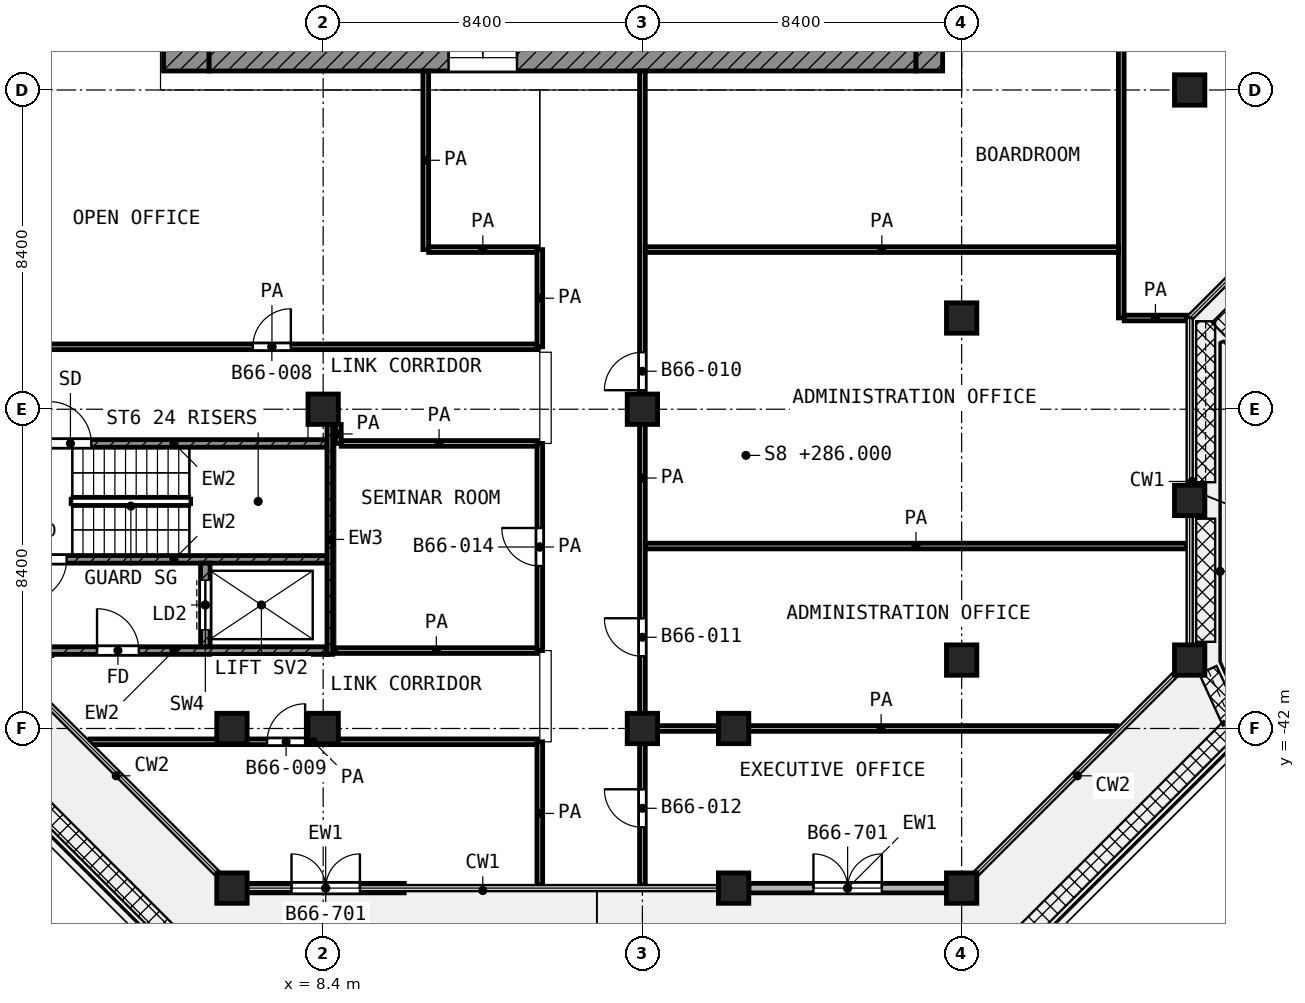
"""IFC4 building model, lengths in metres.
Left out: names, types, materials, properties, quantities, classifications, styles, units other than length and angle.
Written with IfcOpenShell. Run it as: python <this file> out.ifc"""

import sys

from ifc_helpers import new_model, si_unit, direction, frame, frame_2d, origin, origin_2d, place, context, subcontext, project, spatial, rectangle, extrude, element, fill, save


model = new_model("IFC4")
c1 = context("Model", 3, precision=1e-05, world=origin(), true_north=direction((0.0, 1.0)))
c2 = subcontext(c1, "Body", "Model", "MODEL_VIEW")
j1 = project(units=[si_unit("LENGTHUNIT", "METRE"), si_unit("PLANEANGLEUNIT", "RADIAN")], contexts=[c1])
p1 = place(None, origin())
s1 = spatial("IfcSite", under=j1, at=p1, CompositionType="ELEMENT")
p2 = place(p1, origin())
s2 = spatial("IfcBuilding", under=s1, at=p2, CompositionType="ELEMENT")
p3 = place(p2, frame((0.0, 0.0, 286.0)))
s3 = spatial("IfcBuildingStorey", under=s2, at=p3, CompositionType="ELEMENT", Elevation=286.0)
for number, where, z_axis, x_axis in (
    (1, (31.2, -25.2, 0.0), (0.0, 0.0, 1.0), (1.0, 0.0, 0.0)),
    (2, (25.2, -31.2, 0.0), (0.0, 0.0, 1.0), (1.0, 0.0, 0.0)),
    (3, (8.4, -33.6, 0.0), (0.0, 0.0, 1.0), (1.0, 0.0, 0.0)),
    (4, (16.8, -33.6, 0.0), (0.0, 0.0, 1.0), (1.0, 0.0, 0.0)),
    (5, (25.2, -40.2, 0.0), (0.0, 0.0, 1.0), (1.0, 0.0, 0.0)),
    (6, (6.0, -42.0, 0.0), (0.0, 0.0, 1.0), (1.0, 0.0, 0.0)),
    (7, (8.4, -42.0, 0.0), (0.0, 0.0, 1.0), (1.0, 0.0, 0.0)),
    (8, (16.8, -42.0, 0.0), (0.0, 0.0, 1.0), (1.0, 0.0, 0.0)),
    (9, (19.2, -42.0, 0.0), (0.0, 0.0, 1.0), (1.0, 0.0, 0.0)),
    (10, (6.0, -46.2, 0.0), (0.0, 0.0, 1.0), (1.0, 0.0, 0.0)),
    (11, (19.2, -46.2, 0.0), (0.0, 0.0, 1.0), (1.0, 0.0, 0.0)),
    (12, (31.2, -36.0, 0.0), (0.0, 0.0, 1.0), (1.0, 0.0, 0.0)),
    (13, (31.2, -40.2, 0.0), (0.0, 0.0, 1.0), (1.0, 0.0, 0.0)),
    (14, (25.2, -46.2, 0.0), (0.0, 0.0, 1.0), (1.0, 0.0, 0.0)),
):
    element("IfcColumn", number, at=place(p3, frame(where, z_axis=z_axis, x_axis=x_axis)), inside=s3, PredefinedType="COLUMN", context=c2, shape_type="SweptSolid", body=[
        extrude(rectangle(XDim=0.8, YDim=0.8, at=origin_2d()), origin(), (0.0, 0.0, 1.0), 4.2),
    ])
p4 = place(p3, frame((6.4, -46.2, 0.0), z_axis=(0.0, 0.0, 1.0), x_axis=(1.0, 0.0, 0.0)))
e15 = element("IfcWall", 15, at=p4, inside=s3, PredefinedType="SOLIDWALL", context=c2, shape_type="SweptSolid", body=[
    extrude(rectangle(XDim=4.134, YDim=0.25, at=frame_2d((2.067, 0.0))), origin(), (0.0, 0.0, 1.0), 3.48),
])
p5 = place(p4, frame((1.167, 0.0, 0.0)))
e16 = element("IfcOpeningElement", 16, at=p5, cuts=e15, PredefinedType="OPENING", context=c2, shape_type="SweptSolid", body=[
    extrude(rectangle(XDim=1.8, YDim=2.1, at=frame_2d((0.9, 1.05))), frame((0.0, 0.135, 0.0), z_axis=(0.0, -1.0, 0.0), x_axis=(1.0, 0.0, 0.0)), (0.0, 0.0, 1.0), 0.27),
])
p6 = place(p3, frame((19.6, -46.2, 0.0), z_axis=(0.0, 0.0, 1.0), x_axis=(1.0, 0.0, 0.0)))
e17 = element("IfcWall", 17, at=p6, inside=s3, PredefinedType="SOLIDWALL", context=c2, shape_type="SweptSolid", body=[
    extrude(rectangle(XDim=5.2, YDim=0.25, at=frame_2d((2.6, 0.0))), origin(), (0.0, 0.0, 1.0), 3.48),
])
p7 = place(p6, frame((1.7, 0.0, 0.0)))
e18 = element("IfcOpeningElement", 18, at=p7, cuts=e17, PredefinedType="OPENING", context=c2, shape_type="SweptSolid", body=[
    extrude(rectangle(XDim=1.8, YDim=2.1, at=frame_2d((0.9, 1.05))), frame((0.0, 0.135, 0.0), z_axis=(0.0, -1.0, 0.0), x_axis=(1.0, 0.0, 0.0)), (0.0, 0.0, 1.0), 0.27),
])
p8 = place(p3, frame((4.8, -24.7, 0.0), z_axis=(0.0, 0.0, 1.0), x_axis=(0.0, 1.0, 0.0)))
e19 = element("IfcWall", 19, at=p8, inside=s3, PredefinedType="SHEAR", context=c2, shape_type="SweptSolid", body=[
    extrude(rectangle(XDim=19.3, YDim=1.2, at=frame_2d((9.65, 0.0))), origin(), (0.0, 0.0, 1.0), 3.6),
])
p9 = place(p8, frame((11.15, 0.0, 0.0)))
e20 = element("IfcOpeningElement", 20, at=p9, cuts=e19, PredefinedType="OPENING", context=c2, shape_type="SweptSolid", body=[
    extrude(rectangle(XDim=1.1, YDim=2.1, at=frame_2d((0.55, 1.05))), frame((0.0, 0.61, 0.0), z_axis=(0.0, -1.0, 0.0), x_axis=(1.0, 0.0, 0.0)), (0.0, 0.0, 1.0), 1.22),
])
p10 = place(p8, frame((1.85, 0.0, 0.0)))
e21 = element("IfcOpeningElement", 21, at=p10, cuts=e19, PredefinedType="OPENING", context=c2, shape_type="SweptSolid", body=[
    extrude(rectangle(XDim=1.1, YDim=2.1, at=frame_2d((0.55, 1.05))), frame((0.0, 0.61, 0.0), z_axis=(0.0, -1.0, 0.0), x_axis=(1.0, 0.0, 0.0)), (0.0, 0.0, 1.0), 1.22),
])
p11 = place(p3, frame((5.4, -24.35, 0.0), z_axis=(0.0, 0.0, 1.0), x_axis=(1.0, 0.0, 0.0)))
e22 = element("IfcWall", 22, at=p11, inside=s3, PredefinedType="SHEAR", context=c2, shape_type="SweptSolid", body=[
    extrude(rectangle(XDim=18.6, YDim=0.7, at=frame_2d((9.3, 0.0))), origin(), (0.0, 0.0, 1.0), 3.6),
])
p12 = place(p11, frame((6.3, 0.0, 0.0)))
e23 = element("IfcOpeningElement", 23, at=p12, cuts=e22, PredefinedType="OPENING", context=c2, shape_type="SweptSolid", body=[
    extrude(rectangle(XDim=1.8, YDim=2.1, at=frame_2d((0.9, 1.05))), frame((0.0, 0.36, 0.0), z_axis=(0.0, -1.0, 0.0), x_axis=(1.0, 0.0, 0.0)), (0.0, 0.0, 1.0), 0.72),
])
p13 = place(p3, frame((24.35, -24.7, 0.0), z_axis=(0.0, 0.0, 1.0), x_axis=(0.0, 1.0, 0.0)))
e24 = element("IfcWall", 24, at=p13, inside=s3, PredefinedType="SHEAR", context=c2, shape_type="SweptSolid", body=[
    extrude(rectangle(XDim=0.7, YDim=0.7, at=frame_2d((0.35, 0.0))), origin(), (0.0, 0.0, 1.0), 3.6),
])
p14 = place(p3, frame((8.575, -40.05, 0.0), z_axis=(0.0, 0.0, 1.0), x_axis=(0.0, 1.0, 0.0)))
e25 = element("IfcWall", 25, at=p14, inside=s3, PredefinedType="SHEAR", context=c2, shape_type="SweptSolid", body=[
    extrude(rectangle(XDim=6.05, YDim=0.15, at=frame_2d((3.025, 0.0))), origin(), (0.0, 0.0, 1.0), 3.6),
])
p15 = place(p3, frame((0.45, -34.5, 0.0), z_axis=(0.0, 0.0, 1.0), x_axis=(1.0, 0.0, 0.0)))
e26 = element("IfcWall", 26, at=p15, inside=s3, PredefinedType="SHEAR", context=c2, shape_type="SweptSolid", body=[
    extrude(rectangle(XDim=8.05, YDim=0.2, at=frame_2d((4.025, 0.0))), origin(), (0.0, 0.0, 1.0), 3.6),
])
p16 = place(p15, frame((0.75, 0.0, 0.0)))
e27 = element("IfcOpeningElement", 27, at=p16, cuts=e26, PredefinedType="OPENING", context=c2, shape_type="SweptSolid", body=[
    extrude(rectangle(XDim=1.1, YDim=2.1, at=frame_2d((0.55, 1.05))), frame((0.0, 0.11, 0.0), z_axis=(0.0, -1.0, 0.0), x_axis=(1.0, 0.0, 0.0)), (0.0, 0.0, 1.0), 0.22),
])
p17 = place(p3, frame((0.45, -37.55, 0.0), z_axis=(0.0, 0.0, 1.0), x_axis=(1.0, 0.0, 0.0)))
e28 = element("IfcWall", 28, at=p17, inside=s3, PredefinedType="SHEAR", context=c2, shape_type="SweptSolid", body=[
    extrude(rectangle(XDim=8.05, YDim=0.2, at=frame_2d((4.025, 0.0))), origin(), (0.0, 0.0, 1.0), 3.6),
])
p18 = place(p17, frame((0.1, 0.0, 0.0)))
e29 = element("IfcOpeningElement", 29, at=p18, cuts=e28, PredefinedType="OPENING", context=c2, shape_type="SweptSolid", body=[
    extrude(rectangle(XDim=1.1, YDim=2.1, at=frame_2d((0.55, 1.05))), frame((0.0, 0.11, 0.0), z_axis=(0.0, -1.0, 0.0), x_axis=(1.0, 0.0, 0.0)), (0.0, 0.0, 1.0), 0.22),
])
p19 = place(p3, frame((0.45, -39.95, 0.0), z_axis=(0.0, 0.0, 1.0), x_axis=(1.0, 0.0, 0.0)))
e30 = element("IfcWall", 30, at=p19, inside=s3, PredefinedType="SHEAR", context=c2, shape_type="SweptSolid", body=[
    extrude(rectangle(XDim=8.05, YDim=0.2, at=frame_2d((4.025, 0.0))), origin(), (0.0, 0.0, 1.0), 3.6),
])
p20 = place(p19, frame((2.0, 0.0, 0.0)))
e31 = element("IfcOpeningElement", 31, at=p20, cuts=e30, PredefinedType="OPENING", context=c2, shape_type="SweptSolid", body=[
    extrude(rectangle(XDim=1.1, YDim=2.1, at=frame_2d((0.55, 1.05))), frame((0.0, 0.11, 0.0), z_axis=(0.0, -1.0, 0.0), x_axis=(1.0, 0.0, 0.0)), (0.0, 0.0, 1.0), 0.22),
])
p21 = place(p3, frame((5.3, -39.85, 0.0), z_axis=(0.0, 0.0, 1.0), x_axis=(0.0, 1.0, 0.0)))
e32 = element("IfcWall", 32, at=p21, inside=s3, PredefinedType="SHEAR", context=c2, shape_type="SweptSolid", body=[
    extrude(rectangle(XDim=2.2, YDim=0.25, at=frame_2d((1.1, 0.0))), origin(), (0.0, 0.0, 1.0), 3.6),
])
p22 = place(p21, frame((0.45, 0.0, 0.0)))
e33 = element("IfcOpeningElement", 33, at=p22, cuts=e32, PredefinedType="OPENING", context=c2, shape_type="SweptSolid", body=[
    extrude(rectangle(XDim=1.3, YDim=2.1, at=frame_2d((0.65, 1.05))), frame((0.0, 0.135, 0.0), z_axis=(0.0, -1.0, 0.0), x_axis=(1.0, 0.0, 0.0)), (0.0, 0.0, 1.0), 0.27),
])
p23 = place(p3, frame((2.263, -42.35, 0.0), z_axis=(0.0, 0.0, 1.0), x_axis=(1.0, 0.0, 0.0)))
e34 = element("IfcWall", 34, at=p23, inside=s3, PredefinedType="PARTITIONING", context=c2, shape_type="SweptSolid", body=[
    extrude(rectangle(XDim=11.762, YDim=0.15, at=frame_2d((5.881, 0.0))), origin(), (0.0, 0.0, 1.0), 3.6),
])
p24 = place(p23, frame((4.662, 0.0, 0.0)))
e35 = element("IfcOpeningElement", 35, at=p24, cuts=e34, PredefinedType="OPENING", context=c2, shape_type="SweptSolid", body=[
    extrude(rectangle(XDim=1.0, YDim=2.1, at=frame_2d((0.5, 1.05))), frame((0.0, 0.085, 0.0), z_axis=(0.0, -1.0, 0.0), x_axis=(1.0, 0.0, 0.0)), (0.0, 0.0, 1.0), 0.17),
])
p25 = place(p3, frame((16.875, -42.0, 0.0), z_axis=(0.0, 0.0, 1.0), x_axis=(1.0, 0.0, 0.0)))
e36 = element("IfcWall", 36, at=p25, inside=s3, PredefinedType="PARTITIONING", context=c2, shape_type="SweptSolid", body=[
    extrude(rectangle(XDim=12.412, YDim=0.15, at=frame_2d((6.206, 0.0))), origin(), (0.0, 0.0, 1.0), 3.6),
])
p26 = place(p3, frame((8.73, -39.95, 0.0), z_axis=(0.0, 0.0, 1.0), x_axis=(1.0, 0.0, 0.0)))
e37 = element("IfcWall", 37, at=p26, inside=s3, PredefinedType="PARTITIONING", context=c2, shape_type="SweptSolid", body=[
    extrude(rectangle(XDim=5.295, YDim=0.15, at=frame_2d((2.647, 0.0))), origin(), (0.0, 0.0, 1.0), 3.6),
])
p27 = place(p3, frame((16.875, -37.2, 0.0), z_axis=(0.0, 0.0, 1.0), x_axis=(1.0, 0.0, 0.0)))
e38 = element("IfcWall", 38, at=p27, inside=s3, PredefinedType="PARTITIONING", context=c2, shape_type="SweptSolid", body=[
    extrude(rectangle(XDim=14.245, YDim=0.15, at=frame_2d((7.123, 0.0))), origin(), (0.0, 0.0, 1.0), 3.6),
])
p28 = place(p3, frame((8.875, -34.5, 0.0), z_axis=(0.0, 0.0, 1.0), x_axis=(1.0, 0.0, 0.0)))
e39 = element("IfcWall", 39, at=p28, inside=s3, PredefinedType="PARTITIONING", context=c2, shape_type="SweptSolid", body=[
    extrude(rectangle(XDim=5.15, YDim=0.15, at=frame_2d((2.575, 0.0))), origin(), (0.0, 0.0, 1.0), 3.6),
])
p29 = place(p3, frame((0.08, -31.957, 0.0), z_axis=(0.0, 0.0, 1.0), x_axis=(1.0, 0.0, 0.0)))
e40 = element("IfcWall", 40, at=p29, inside=s3, PredefinedType="PARTITIONING", context=c2, shape_type="SweptSolid", body=[
    extrude(rectangle(XDim=13.945, YDim=0.15, at=frame_2d((6.972, 0.0))), origin(), (0.0, 0.0, 1.0), 3.6),
])
p30 = place(p29, frame((6.47, 0.0, 0.0)))
e41 = element("IfcOpeningElement", 41, at=p30, cuts=e40, PredefinedType="OPENING", context=c2, shape_type="SweptSolid", body=[
    extrude(rectangle(XDim=1.0, YDim=2.1, at=frame_2d((0.5, 1.05))), frame((0.0, 0.085, 0.0), z_axis=(0.0, -1.0, 0.0), x_axis=(1.0, 0.0, 0.0)), (0.0, 0.0, 1.0), 0.17),
])
p31 = place(p3, frame((29.477, -31.2, 0.0), z_axis=(0.0, 0.0, 1.0), x_axis=(1.0, 0.0, 0.0)))
e42 = element("IfcWall", 42, at=p31, inside=s3, PredefinedType="PARTITIONING", context=c2, shape_type="SweptSolid", body=[
    extrude(rectangle(XDim=1.643, YDim=0.15, at=frame_2d((0.822, 0.0))), origin(), (0.0, 0.0, 1.0), 3.6),
])
p32 = place(p3, frame((11.177, -29.4, 0.0), z_axis=(0.0, 0.0, 1.0), x_axis=(1.0, 0.0, 0.0)))
e43 = element("IfcWall", 43, at=p32, inside=s3, PredefinedType="PARTITIONING", context=c2, shape_type="SweptSolid", body=[
    extrude(rectangle(XDim=2.848, YDim=0.15, at=frame_2d((1.424, 0.0))), origin(), (0.0, 0.0, 1.0), 3.6),
])
p33 = place(p3, frame((16.875, -29.4, 0.0), z_axis=(0.0, 0.0, 1.0), x_axis=(1.0, 0.0, 0.0)))
e44 = element("IfcWall", 44, at=p33, inside=s3, PredefinedType="PARTITIONING", context=c2, shape_type="SweptSolid", body=[
    extrude(rectangle(XDim=12.45, YDim=0.15, at=frame_2d((6.225, 0.0))), origin(), (0.0, 0.0, 1.0), 3.6),
])
p34 = place(p3, frame((8.8, -34.5, 0.0), z_axis=(0.0, 0.0, 1.0), x_axis=(0.0, 1.0, 0.0)))
e45 = element("IfcWall", 45, at=p34, inside=s3, PredefinedType="PARTITIONING", context=c2, shape_type="SweptSolid", body=[
    extrude(rectangle(XDim=0.5, YDim=0.15, at=frame_2d((0.25, 0.0))), origin(), (0.0, 0.0, 1.0), 3.6),
])
p35 = place(p3, frame((11.1, -29.399, 0.0), z_axis=(0.0, 0.0, 1.0), x_axis=(0.0, 1.0, 0.0)))
e46 = element("IfcWall", 46, at=p35, inside=s3, PredefinedType="PARTITIONING", context=c2, shape_type="SweptSolid", body=[
    extrude(rectangle(XDim=4.699, YDim=0.15, at=frame_2d((2.35, 0.0))), origin(), (0.0, 0.0, 1.0), 3.6),
])
p36 = place(p3, frame((14.1, -46.12, 0.0), z_axis=(0.0, 0.0, 1.0), x_axis=(0.0, 1.0, 0.0)))
e47 = element("IfcWall", 47, at=p36, inside=s3, PredefinedType="PARTITIONING", context=c2, shape_type="SweptSolid", body=[
    extrude(rectangle(XDim=3.77, YDim=0.15, at=frame_2d((1.885, 0.0))), origin(), (0.0, 0.0, 1.0), 3.6),
])
p37 = place(p3, frame((14.1, -39.95, 0.0), z_axis=(0.0, 0.0, 1.0), x_axis=(0.0, 1.0, 0.0)))
e48 = element("IfcWall", 48, at=p37, inside=s3, PredefinedType="PARTITIONING", context=c2, shape_type="SweptSolid", body=[
    extrude(rectangle(XDim=5.45, YDim=0.15, at=frame_2d((2.725, 0.0))), origin(), (0.0, 0.0, 1.0), 3.6),
])
p38 = place(p37, frame((2.225, 0.0, 0.0)))
e49 = element("IfcOpeningElement", 49, at=p38, cuts=e48, PredefinedType="OPENING", context=c2, shape_type="SweptSolid", body=[
    extrude(rectangle(XDim=1.0, YDim=2.1, at=frame_2d((0.5, 1.05))), frame((0.0, 0.085, 0.0), z_axis=(0.0, -1.0, 0.0), x_axis=(1.0, 0.0, 0.0)), (0.0, 0.0, 1.0), 0.17),
])
p39 = place(p3, frame((14.1, -31.957, 0.0), z_axis=(0.0, 0.0, 1.0), x_axis=(0.0, 1.0, 0.0)))
e50 = element("IfcWall", 50, at=p39, inside=s3, PredefinedType="PARTITIONING", context=c2, shape_type="SweptSolid", body=[
    extrude(rectangle(XDim=2.557, YDim=0.15, at=frame_2d((1.279, 0.0))), origin(), (0.0, 0.0, 1.0), 3.6),
])
p40 = place(p3, frame((16.8, -46.12, 0.0), z_axis=(0.0, 0.0, 1.0), x_axis=(0.0, 1.0, 0.0)))
e51 = element("IfcWall", 51, at=p40, inside=s3, PredefinedType="PARTITIONING", context=c2, shape_type="SweptSolid", body=[
    extrude(rectangle(XDim=21.42, YDim=0.15, at=frame_2d((10.71, 0.0))), origin(), (0.0, 0.0, 1.0), 3.6),
])
p41 = place(p40, frame((13.02, 0.0, 0.0)))
e52 = element("IfcOpeningElement", 52, at=p41, cuts=e51, PredefinedType="OPENING", context=c2, shape_type="SweptSolid", body=[
    extrude(rectangle(XDim=1.0, YDim=2.1, at=frame_2d((0.5, 1.05))), frame((0.0, 0.085, 0.0), z_axis=(0.0, -1.0, 0.0), x_axis=(1.0, 0.0, 0.0)), (0.0, 0.0, 1.0), 0.17),
])
p42 = place(p40, frame((6.02, 0.0, 0.0)))
e53 = element("IfcOpeningElement", 53, at=p42, cuts=e51, PredefinedType="OPENING", context=c2, shape_type="SweptSolid", body=[
    extrude(rectangle(XDim=1.0, YDim=2.1, at=frame_2d((0.5, 1.05))), frame((0.0, 0.085, 0.0), z_axis=(0.0, -1.0, 0.0), x_axis=(1.0, 0.0, 0.0)), (0.0, 0.0, 1.0), 0.17),
])
p43 = place(p40, frame((1.52, 0.0, 0.0)))
e54 = element("IfcOpeningElement", 54, at=p43, cuts=e51, PredefinedType="OPENING", context=c2, shape_type="SweptSolid", body=[
    extrude(rectangle(XDim=1.0, YDim=2.1, at=frame_2d((0.5, 1.05))), frame((0.0, 0.085, 0.0), z_axis=(0.0, -1.0, 0.0), x_axis=(1.0, 0.0, 0.0)), (0.0, 0.0, 1.0), 0.17),
])
p44 = place(p3, frame((29.4, -31.198, 0.0), z_axis=(0.0, 0.0, 1.0), x_axis=(0.0, 1.0, 0.0)))
e55 = element("IfcWall", 55, at=p44, inside=s3, PredefinedType="PARTITIONING", context=c2, shape_type="SweptSolid", body=[
    extrude(rectangle(XDim=14.323, YDim=0.15, at=frame_2d((7.162, 0.0))), origin(), (0.0, 0.0, 1.0), 3.6),
])
p45 = place(p5, origin())
e56 = element("IfcDoor", 56, at=p45, inside=s3, OperationType="DOUBLE_DOOR_SINGLE_SWING", PredefinedType="DOOR", context=c2, shape_type="SweptSolid", body=[
    extrude(rectangle(XDim=1.8, YDim=2.1, at=frame_2d((0.9, 1.05))), frame((0.0, 0.025, 0.0), z_axis=(0.0, -1.0, 0.0), x_axis=(1.0, 0.0, 0.0)), (0.0, 0.0, 1.0), 0.05),
])
fill(e16, e56)
p46 = place(p7, origin())
e57 = element("IfcDoor", 57, at=p46, inside=s3, OperationType="DOUBLE_DOOR_SINGLE_SWING", PredefinedType="DOOR", context=c2, shape_type="SweptSolid", body=[
    extrude(rectangle(XDim=1.8, YDim=2.1, at=frame_2d((0.9, 1.05))), frame((0.0, 0.025, 0.0), z_axis=(0.0, -1.0, 0.0), x_axis=(1.0, 0.0, 0.0)), (0.0, 0.0, 1.0), 0.05),
])
fill(e18, e57)
p47 = place(p12, origin())
e58 = element("IfcDoor", 58, at=p47, inside=s3, OperationType="DOUBLE_DOOR_SINGLE_SWING", PredefinedType="DOOR", context=c2, shape_type="SweptSolid", body=[
    extrude(rectangle(XDim=1.8, YDim=2.1, at=frame_2d((0.9, 1.05))), frame((0.0, 0.025, 0.0), z_axis=(0.0, -1.0, 0.0), x_axis=(1.0, 0.0, 0.0)), (0.0, 0.0, 1.0), 0.05),
])
fill(e23, e58)
p48 = place(p16, origin())
e59 = element("IfcDoor", 59, at=p48, inside=s3, OperationType="SINGLE_SWING_LEFT", PredefinedType="DOOR", context=c2, shape_type="SweptSolid", body=[
    extrude(rectangle(XDim=1.1, YDim=2.1, at=frame_2d((0.55, 1.05))), frame((0.0, 0.025, 0.0), z_axis=(0.0, -1.0, 0.0), x_axis=(1.0, 0.0, 0.0)), (0.0, 0.0, 1.0), 0.05),
])
fill(e27, e59)
p49 = place(p18, frame((1.1, 0.0, 0.0), z_axis=(0.0, 0.0, 1.0), x_axis=(-1.0, 0.0, 0.0)))
e60 = element("IfcDoor", 60, at=p49, inside=s3, OperationType="SINGLE_SWING_LEFT", PredefinedType="DOOR", context=c2, shape_type="SweptSolid", body=[
    extrude(rectangle(XDim=1.1, YDim=2.1, at=frame_2d((0.55, 1.05))), frame((0.0, 0.025, 0.0), z_axis=(0.0, -1.0, 0.0), x_axis=(1.0, 0.0, 0.0)), (0.0, 0.0, 1.0), 0.05),
])
fill(e29, e60)
p50 = place(p22, origin())
e61 = element("IfcDoor", 61, at=p50, inside=s3, OperationType="DOUBLE_DOOR_SLIDING", PredefinedType="DOOR", context=c2, shape_type="SweptSolid", body=[
    extrude(rectangle(XDim=1.3, YDim=2.1, at=frame_2d((0.65, 1.05))), frame((0.0, 0.025, 0.0), z_axis=(0.0, -1.0, 0.0), x_axis=(1.0, 0.0, 0.0)), (0.0, 0.0, 1.0), 0.05),
])
fill(e33, e61)
p51 = place(p20, origin())
e62 = element("IfcDoor", 62, at=p51, inside=s3, OperationType="SINGLE_SWING_LEFT", PredefinedType="DOOR", context=c2, shape_type="SweptSolid", body=[
    extrude(rectangle(XDim=1.1, YDim=2.1, at=frame_2d((0.55, 1.05))), frame((0.0, 0.025, 0.0), z_axis=(0.0, -1.0, 0.0), x_axis=(1.0, 0.0, 0.0)), (0.0, 0.0, 1.0), 0.05),
])
fill(e31, e62)
p52 = place(p30, origin())
e63 = element("IfcDoor", 63, at=p52, inside=s3, OperationType="SINGLE_SWING_RIGHT", PredefinedType="DOOR", context=c2, shape_type="SweptSolid", body=[
    extrude(rectangle(XDim=1.0, YDim=2.1, at=frame_2d((0.5, 1.05))), frame((0.0, 0.025, 0.0), z_axis=(0.0, -1.0, 0.0), x_axis=(1.0, 0.0, 0.0)), (0.0, 0.0, 1.0), 0.05),
])
fill(e41, e63)
p53 = place(p24, origin())
e64 = element("IfcDoor", 64, at=p53, inside=s3, OperationType="SINGLE_SWING_RIGHT", PredefinedType="DOOR", context=c2, shape_type="SweptSolid", body=[
    extrude(rectangle(XDim=1.0, YDim=2.1, at=frame_2d((0.5, 1.05))), frame((0.0, 0.025, 0.0), z_axis=(0.0, -1.0, 0.0), x_axis=(1.0, 0.0, 0.0)), (0.0, 0.0, 1.0), 0.05),
])
fill(e35, e64)
p54 = place(p41, origin())
e65 = element("IfcDoor", 65, at=p54, inside=s3, OperationType="SINGLE_SWING_LEFT", PredefinedType="DOOR", context=c2, shape_type="SweptSolid", body=[
    extrude(rectangle(XDim=1.0, YDim=2.1, at=frame_2d((0.5, 1.05))), frame((0.0, 0.025, 0.0), z_axis=(0.0, -1.0, 0.0), x_axis=(1.0, 0.0, 0.0)), (0.0, 0.0, 1.0), 0.05),
])
fill(e52, e65)
p55 = place(p42, origin())
e66 = element("IfcDoor", 66, at=p55, inside=s3, OperationType="SINGLE_SWING_RIGHT", PredefinedType="DOOR", context=c2, shape_type="SweptSolid", body=[
    extrude(rectangle(XDim=1.0, YDim=2.1, at=frame_2d((0.5, 1.05))), frame((0.0, 0.025, 0.0), z_axis=(0.0, -1.0, 0.0), x_axis=(1.0, 0.0, 0.0)), (0.0, 0.0, 1.0), 0.05),
])
fill(e53, e66)
p56 = place(p43, origin())
e67 = element("IfcDoor", 67, at=p56, inside=s3, OperationType="SINGLE_SWING_RIGHT", PredefinedType="DOOR", context=c2, shape_type="SweptSolid", body=[
    extrude(rectangle(XDim=1.0, YDim=2.1, at=frame_2d((0.5, 1.05))), frame((0.0, 0.025, 0.0), z_axis=(0.0, -1.0, 0.0), x_axis=(1.0, 0.0, 0.0)), (0.0, 0.0, 1.0), 0.05),
])
fill(e54, e67)
p57 = place(p38, origin())
e68 = element("IfcDoor", 68, at=p57, inside=s3, OperationType="SINGLE_SWING_RIGHT", PredefinedType="DOOR", context=c2, shape_type="SweptSolid", body=[
    extrude(rectangle(XDim=1.0, YDim=2.1, at=frame_2d((0.5, 1.05))), frame((0.0, 0.025, 0.0), z_axis=(0.0, -1.0, 0.0), x_axis=(1.0, 0.0, 0.0)), (0.0, 0.0, 1.0), 0.05),
])
fill(e49, e68)
save(model, sys.argv[1])
